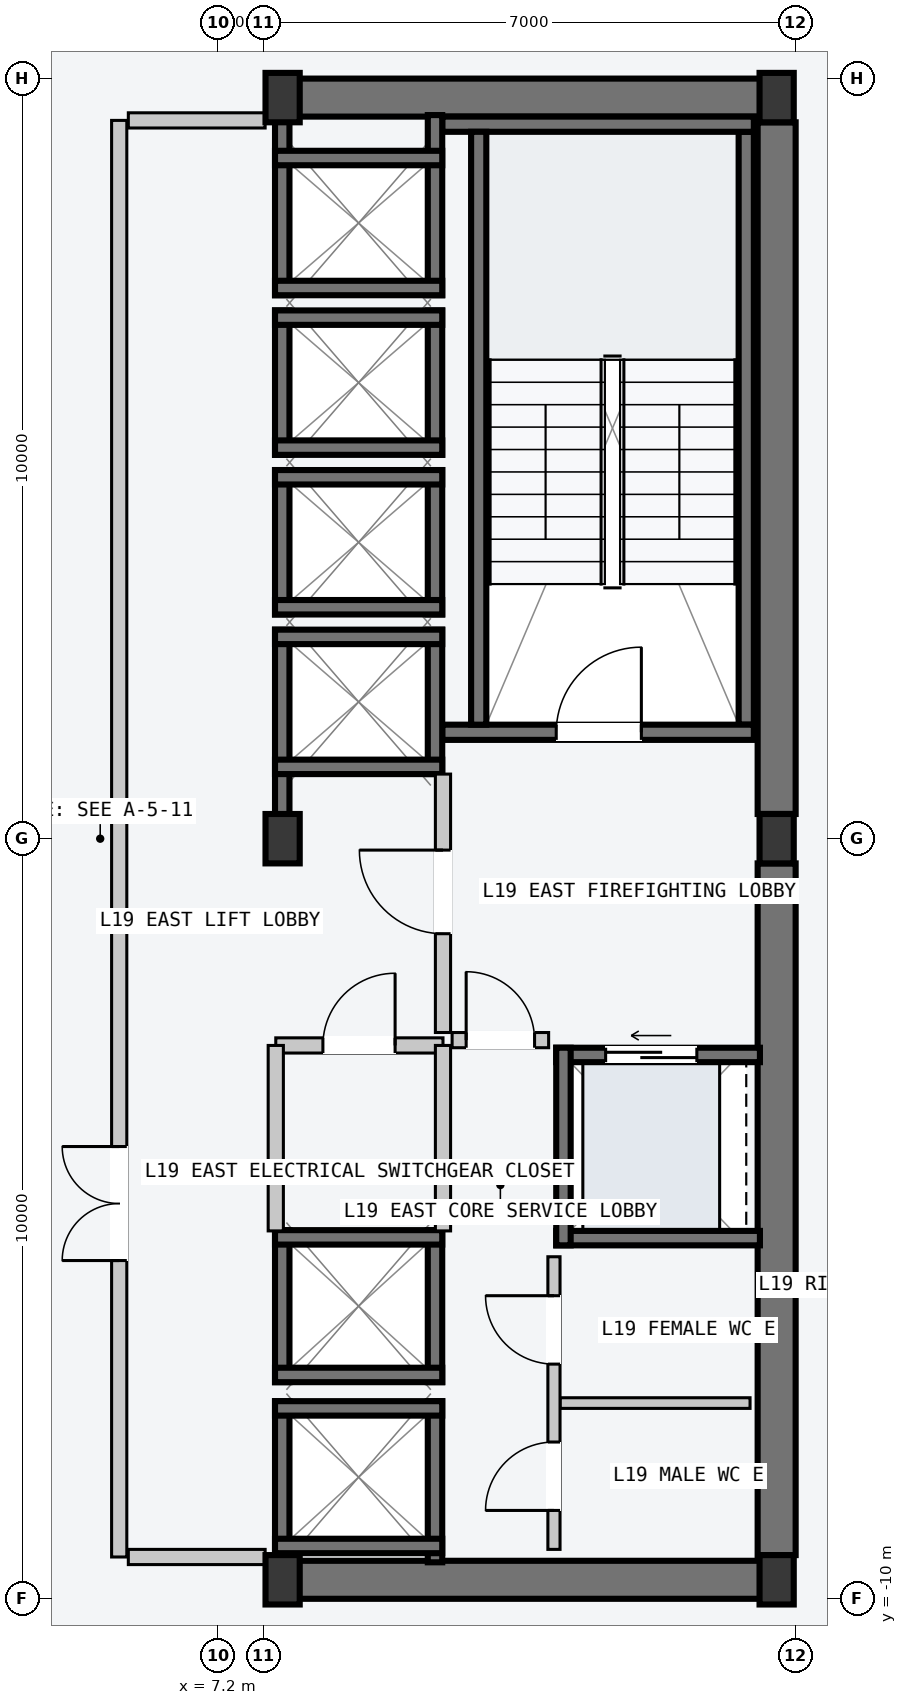
"""IFC4 building model, lengths in metres.
Left out: names, types, materials, properties, quantities, classifications, styles, units other than length and angle.
Written with IfcOpenShell. Run it as: python <this file> out.ifc"""

import sys

from ifc_helpers import new_model, si_unit, direction, frame, frame_2d, origin, origin_2d, place, context, subcontext, project, spatial, rectangle, i_section, extrude, element, fill, save


model = new_model("IFC4")
c1 = context("Model", 3, precision=1e-05, world=origin(), true_north=direction((0.0, 1.0)))
c2 = subcontext(c1, "Body", "Model", "MODEL_VIEW")
j1 = project(units=[si_unit("LENGTHUNIT", "METRE"), si_unit("PLANEANGLEUNIT", "RADIAN")], contexts=[c1])
p1 = place(None, origin())
s1 = spatial("IfcSite", under=j1, at=p1, CompositionType="ELEMENT")
p2 = place(p1, origin())
s2 = spatial("IfcBuilding", under=s1, at=p2, CompositionType="ELEMENT")
p3 = place(p2, frame((0.0, 0.0, 74.4)))
s3 = spatial("IfcBuildingStorey", under=s2, at=p3, CompositionType="ELEMENT", Elevation=74.4)
for number, where, z_axis, x_axis in (
    (1, (8.07, -9.75, -0.2), (0.0, 0.0, 1.0), (1.0, 0.0, 0.0)),
    (2, (8.07, 9.75, -0.2), (0.0, 0.0, 1.0), (1.0, 0.0, 0.0)),
):
    element("IfcWall", number, at=place(p3, frame(where, z_axis=z_axis, x_axis=x_axis)), inside=s3, PredefinedType="SHEAR", context=c2, shape_type="SweptSolid", body=[
        extrude(rectangle(XDim=6.46, YDim=0.5, at=frame_2d((3.23, 0.0))), origin(), (0.0, 0.0, 1.0), 3.6),
    ])
for number, where, z_axis, x_axis in (
    (3, (14.55, -9.425, -0.2), (0.0, 0.0, 1.0), (0.0, 1.0, 0.0)),
    (4, (14.55, 0.325, -0.2), (0.0, 0.0, 1.0), (0.0, 1.0, 0.0)),
):
    element("IfcWall", number, at=place(p3, frame(where, z_axis=z_axis, x_axis=x_axis)), inside=s3, PredefinedType="SHEAR", context=c2, shape_type="SweptSolid", body=[
        extrude(rectangle(XDim=9.1, YDim=0.5, at=frame_2d((4.55, 0.0))), origin(), (0.0, 0.0, 1.0), 3.6),
    ])
p4 = place(p3, frame((14.15, 1.5, -0.2), z_axis=(0.0, 0.0, 1.0), x_axis=(0.0, 1.0, 0.0)))
e5 = element("IfcWall", 5, at=p4, inside=s3, PredefinedType="SOLIDWALL", context=c2, shape_type="SweptSolid", body=[
    extrude(rectangle(XDim=7.8, YDim=0.2, at=frame_2d((3.9, 0.0))), origin(), (0.0, 0.0, 1.0), 3.6),
])
p5 = place(p3, frame((10.15, 1.4, -0.2), z_axis=(0.0, 0.0, 1.0), x_axis=(1.0, 0.0, 0.0)))
e6 = element("IfcWall", 6, at=p5, inside=s3, PredefinedType="SOLIDWALL", context=c2, shape_type="SweptSolid", body=[
    extrude(rectangle(XDim=4.1, YDim=0.2, at=frame_2d((2.05, 0.0))), origin(), (0.0, 0.0, 1.0), 3.6),
])
p6 = place(p5, frame((1.5, 0.0, 0.2)))
e7 = element("IfcOpeningElement", 7, at=p6, cuts=e6, PredefinedType="OPENING", context=c2, shape_type="SweptSolid", body=[
    extrude(rectangle(XDim=1.12, YDim=2.18, at=frame_2d((0.56, 1.09))), frame((0.0, 0.11, 0.0), z_axis=(0.0, -1.0, 0.0), x_axis=(1.0, 0.0, 0.0)), (0.0, 0.0, 1.0), 0.22),
])
p7 = place(p3, frame((10.15, 9.4, -0.2), z_axis=(0.0, 0.0, 1.0), x_axis=(1.0, 0.0, 0.0)))
e8 = element("IfcWall", 8, at=p7, inside=s3, PredefinedType="SOLIDWALL", context=c2, shape_type="SweptSolid", body=[
    extrude(rectangle(XDim=4.1, YDim=0.2, at=frame_2d((2.05, 0.0))), origin(), (0.0, 0.0, 1.0), 3.6),
])
p8 = place(p3, frame((10.63, 1.5, -0.2), z_axis=(0.0, 0.0, 1.0), x_axis=(0.0, 1.0, 0.0)))
e9 = element("IfcWall", 9, at=p8, inside=s3, PredefinedType="SOLIDWALL", context=c2, shape_type="SweptSolid", body=[
    extrude(rectangle(XDim=7.8, YDim=0.2, at=frame_2d((3.9, 0.0))), origin(), (0.0, 0.0, 1.0), 3.6),
])
for number, where, z_axis, x_axis in (
    (10, (8.05, -9.75, 0.0), (0.0, 0.0, 1.0), (1.0, 0.0, 0.0)),
    (11, (8.05, 0.0, 0.0), (0.0, 0.0, 1.0), (1.0, 0.0, 0.0)),
    (12, (8.05, 9.75, 0.0), (0.0, 0.0, 1.0), (1.0, 0.0, 0.0)),
    (13, (14.55, -9.75, 0.0), (0.0, 0.0, 1.0), (1.0, 0.0, 0.0)),
    (14, (14.55, 0.0, 0.0), (0.0, 0.0, 1.0), (1.0, 0.0, 0.0)),
    (15, (14.55, 9.75, 0.0), (0.0, 0.0, 1.0), (1.0, 0.0, 0.0)),
):
    element("IfcColumn", number, at=place(p3, frame(where, z_axis=z_axis, x_axis=x_axis)), inside=s3, PredefinedType="COLUMN", context=c2, shape_type="SweptSolid", body=[
        extrude(i_section(OverallWidth=0.45, OverallDepth=0.65, WebThickness=0.025, FlangeThickness=0.04, at=origin_2d()), origin(), (0.0, 0.0, 1.0), 3.6),
    ])
p9 = place(p3, frame((8.045, 0.21, -0.2), z_axis=(0.0, 0.0, 1.0), x_axis=(0.0, 1.0, 0.0)))
e16 = element("IfcWall", 16, at=p9, inside=s3, PredefinedType="SOLIDWALL", context=c2, shape_type="SweptSolid", body=[
    extrude(rectangle(XDim=2.54, YDim=0.19, at=frame_2d((1.27, 0.0))), origin(), (0.0, 0.0, 1.0), 3.6),
])
p10 = place(p3, frame((10.055, 0.85, -0.2), z_axis=(0.0, 0.0, 1.0), x_axis=(0.0, 1.0, 0.0)))
e17 = element("IfcWall", 17, at=p10, inside=s3, PredefinedType="SOLIDWALL", context=c2, shape_type="SweptSolid", body=[
    extrude(rectangle(XDim=1.9, YDim=0.19, at=frame_2d((0.95, 0.0))), origin(), (0.0, 0.0, 1.0), 3.6),
])
for number, where, z_axis, x_axis in (
    (18, (7.95, 2.655, -0.2), (0.0, 0.0, 1.0), (1.0, 0.0, 0.0)),
    (19, (7.95, 0.945, -0.2), (0.0, 0.0, 1.0), (1.0, 0.0, 0.0)),
):
    element("IfcWall", number, at=place(p3, frame(where, z_axis=z_axis, x_axis=x_axis)), inside=s3, PredefinedType="SOLIDWALL", context=c2, shape_type="SweptSolid", body=[
        extrude(rectangle(XDim=2.2, YDim=0.19, at=frame_2d((1.1, 0.0))), origin(), (0.0, 0.0, 1.0), 3.6),
    ])
for number, where, z_axis, x_axis in (
    (20, (8.045, 2.95, -0.2), (0.0, 0.0, 1.0), (0.0, 1.0, 0.0)),
    (21, (10.055, 2.95, -0.2), (0.0, 0.0, 1.0), (0.0, 1.0, 0.0)),
):
    element("IfcWall", number, at=place(p3, frame(where, z_axis=z_axis, x_axis=x_axis)), inside=s3, PredefinedType="SOLIDWALL", context=c2, shape_type="SweptSolid", body=[
        extrude(rectangle(XDim=1.9, YDim=0.19, at=frame_2d((0.95, 0.0))), origin(), (0.0, 0.0, 1.0), 3.6),
    ])
for number, where, z_axis, x_axis in (
    (22, (7.95, 4.755, -0.2), (0.0, 0.0, 1.0), (1.0, 0.0, 0.0)),
    (23, (7.95, 3.045, -0.2), (0.0, 0.0, 1.0), (1.0, 0.0, 0.0)),
):
    element("IfcWall", number, at=place(p3, frame(where, z_axis=z_axis, x_axis=x_axis)), inside=s3, PredefinedType="SOLIDWALL", context=c2, shape_type="SweptSolid", body=[
        extrude(rectangle(XDim=2.2, YDim=0.19, at=frame_2d((1.1, 0.0))), origin(), (0.0, 0.0, 1.0), 3.6),
    ])
for number, where, z_axis, x_axis in (
    (24, (8.045, 5.05, -0.2), (0.0, 0.0, 1.0), (0.0, 1.0, 0.0)),
    (25, (10.055, 5.05, -0.2), (0.0, 0.0, 1.0), (0.0, 1.0, 0.0)),
):
    element("IfcWall", number, at=place(p3, frame(where, z_axis=z_axis, x_axis=x_axis)), inside=s3, PredefinedType="SOLIDWALL", context=c2, shape_type="SweptSolid", body=[
        extrude(rectangle(XDim=1.9, YDim=0.19, at=frame_2d((0.95, 0.0))), origin(), (0.0, 0.0, 1.0), 3.6),
    ])
for number, where, z_axis, x_axis in (
    (26, (7.95, 6.855, -0.2), (0.0, 0.0, 1.0), (1.0, 0.0, 0.0)),
    (27, (7.95, 5.145, -0.2), (0.0, 0.0, 1.0), (1.0, 0.0, 0.0)),
):
    element("IfcWall", number, at=place(p3, frame(where, z_axis=z_axis, x_axis=x_axis)), inside=s3, PredefinedType="SOLIDWALL", context=c2, shape_type="SweptSolid", body=[
        extrude(rectangle(XDim=2.2, YDim=0.19, at=frame_2d((1.1, 0.0))), origin(), (0.0, 0.0, 1.0), 3.6),
    ])
for number, where, z_axis, x_axis in (
    (28, (8.045, 7.15, -0.2), (0.0, 0.0, 1.0), (0.0, 1.0, 0.0)),
    (29, (10.055, 7.15, -0.2), (0.0, 0.0, 1.0), (0.0, 1.0, 0.0)),
):
    element("IfcWall", number, at=place(p3, frame(where, z_axis=z_axis, x_axis=x_axis)), inside=s3, PredefinedType="SOLIDWALL", context=c2, shape_type="SweptSolid", body=[
        extrude(rectangle(XDim=2.37, YDim=0.19, at=frame_2d((1.185, 0.0))), origin(), (0.0, 0.0, 1.0), 3.6),
    ])
for number, where, z_axis, x_axis in (
    (30, (7.95, 8.955, -0.2), (0.0, 0.0, 1.0), (1.0, 0.0, 0.0)),
    (31, (7.95, 7.245, -0.2), (0.0, 0.0, 1.0), (1.0, 0.0, 0.0)),
):
    element("IfcWall", number, at=place(p3, frame(where, z_axis=z_axis, x_axis=x_axis)), inside=s3, PredefinedType="SOLIDWALL", context=c2, shape_type="SweptSolid", body=[
        extrude(rectangle(XDim=2.2, YDim=0.19, at=frame_2d((1.1, 0.0))), origin(), (0.0, 0.0, 1.0), 3.6),
    ])
for number, where, z_axis, x_axis in (
    (32, (8.045, -9.52, -0.2), (0.0, 0.0, 1.0), (0.0, 1.0, 0.0)),
    (33, (10.055, -9.52, -0.2), (0.0, 0.0, 1.0), (0.0, 1.0, 0.0)),
):
    element("IfcWall", number, at=place(p3, frame(where, z_axis=z_axis, x_axis=x_axis)), inside=s3, PredefinedType="SOLIDWALL", context=c2, shape_type="SweptSolid", body=[
        extrude(rectangle(XDim=2.12, YDim=0.19, at=frame_2d((1.06, 0.0))), origin(), (0.0, 0.0, 1.0), 3.6),
    ])
for number, where, z_axis, x_axis in (
    (34, (7.95, -7.495, -0.2), (0.0, 0.0, 1.0), (1.0, 0.0, 0.0)),
    (35, (7.95, -9.305, -0.2), (0.0, 0.0, 1.0), (1.0, 0.0, 0.0)),
):
    element("IfcWall", number, at=place(p3, frame(where, z_axis=z_axis, x_axis=x_axis)), inside=s3, PredefinedType="SOLIDWALL", context=c2, shape_type="SweptSolid", body=[
        extrude(rectangle(XDim=2.2, YDim=0.19, at=frame_2d((1.1, 0.0))), origin(), (0.0, 0.0, 1.0), 3.6),
    ])
for number, where, z_axis, x_axis in (
    (36, (8.045, -7.15, -0.2), (0.0, 0.0, 1.0), (0.0, 1.0, 0.0)),
    (37, (10.055, -7.15, -0.2), (0.0, 0.0, 1.0), (0.0, 1.0, 0.0)),
):
    element("IfcWall", number, at=place(p3, frame(where, z_axis=z_axis, x_axis=x_axis)), inside=s3, PredefinedType="SOLIDWALL", context=c2, shape_type="SweptSolid", body=[
        extrude(rectangle(XDim=2.0, YDim=0.19, at=frame_2d((1.0, 0.0))), origin(), (0.0, 0.0, 1.0), 3.6),
    ])
for number, where, z_axis, x_axis in (
    (38, (7.95, -5.245, -0.2), (0.0, 0.0, 1.0), (1.0, 0.0, 0.0)),
    (39, (7.95, -7.055, -0.2), (0.0, 0.0, 1.0), (1.0, 0.0, 0.0)),
):
    element("IfcWall", number, at=place(p3, frame(where, z_axis=z_axis, x_axis=x_axis)), inside=s3, PredefinedType="SOLIDWALL", context=c2, shape_type="SweptSolid", body=[
        extrude(rectangle(XDim=2.2, YDim=0.19, at=frame_2d((1.1, 0.0))), origin(), (0.0, 0.0, 1.0), 3.6),
    ])
p11 = place(p3, frame((11.65, -2.845, -0.2), z_axis=(0.0, 0.0, 1.0), x_axis=(1.0, 0.0, 0.0)))
e40 = element("IfcWall", 40, at=p11, inside=s3, PredefinedType="SOLIDWALL", context=c2, shape_type="SweptSolid", body=[
    extrude(rectangle(XDim=2.68, YDim=0.19, at=frame_2d((1.34, 0.0))), origin(), (0.0, 0.0, 1.0), 3.6),
])
p12 = place(p11, frame((0.65, 0.0, 0.2)))
e41 = element("IfcOpeningElement", 41, at=p12, cuts=e40, PredefinedType="OPENING", context=c2, shape_type="SweptSolid", body=[
    extrude(rectangle(XDim=1.2, YDim=2.2, at=frame_2d((0.6, 1.1))), frame((0.0, 0.105, 0.0), z_axis=(0.0, -1.0, 0.0), x_axis=(1.0, 0.0, 0.0)), (0.0, 0.0, 1.0), 0.21),
])
p13 = place(p3, frame((11.65, -5.255, -0.2), z_axis=(0.0, 0.0, 1.0), x_axis=(1.0, 0.0, 0.0)))
e42 = element("IfcWall", 42, at=p13, inside=s3, PredefinedType="SOLIDWALL", context=c2, shape_type="SweptSolid", body=[
    extrude(rectangle(XDim=2.68, YDim=0.19, at=frame_2d((1.34, 0.0))), origin(), (0.0, 0.0, 1.0), 3.6),
])
p14 = place(p3, frame((11.745, -5.35, -0.2), z_axis=(0.0, 0.0, 1.0), x_axis=(0.0, 1.0, 0.0)))
e43 = element("IfcWall", 43, at=p14, inside=s3, PredefinedType="SOLIDWALL", context=c2, shape_type="SweptSolid", body=[
    extrude(rectangle(XDim=2.6, YDim=0.19, at=frame_2d((1.3, 0.0))), origin(), (0.0, 0.0, 1.0), 3.6),
])
p15 = place(p3, frame((5.9, -9.45, 0.0), z_axis=(0.0, 0.0, 1.0), x_axis=(0.0, 1.0, 0.0)))
e44 = element("IfcWall", 44, at=p15, inside=s3, PredefinedType="PARTITIONING", context=c2, shape_type="SweptSolid", body=[
    extrude(rectangle(XDim=18.9, YDim=0.2, at=frame_2d((9.45, 0.0))), origin(), (0.0, 0.0, 1.0), 3.4),
])
p16 = place(p15, frame((3.9, 0.0, 0.0)))
e45 = element("IfcOpeningElement", 45, at=p16, cuts=e44, PredefinedType="OPENING", context=c2, shape_type="SweptSolid", body=[
    extrude(rectangle(XDim=1.5, YDim=2.2, at=frame_2d((0.75, 1.1))), frame((0.0, 0.11, 0.0), z_axis=(0.0, -1.0, 0.0), x_axis=(1.0, 0.0, 0.0)), (0.0, 0.0, 1.0), 0.22),
])
for number, where, z_axis, x_axis in (
    (46, (6.02, -9.45, 0.0), (0.0, 0.0, 1.0), (1.0, 0.0, 0.0)),
    (47, (6.02, 9.45, 0.0), (0.0, 0.0, 1.0), (1.0, 0.0, 0.0)),
):
    element("IfcWall", number, at=place(p3, frame(where, z_axis=z_axis, x_axis=x_axis)), inside=s3, PredefinedType="PARTITIONING", context=c2, shape_type="SweptSolid", body=[
        extrude(rectangle(XDim=1.8, YDim=0.2, at=frame_2d((0.9, 0.0))), origin(), (0.0, 0.0, 1.0), 3.4),
    ])
p17 = place(p3, frame((10.16, -2.55, 0.0), z_axis=(0.0, 0.0, 1.0), x_axis=(0.0, 1.0, 0.0)))
e48 = element("IfcWall", 48, at=p17, inside=s3, PredefinedType="PARTITIONING", context=c2, shape_type="SweptSolid", body=[
    extrude(rectangle(XDim=3.4, YDim=0.2, at=frame_2d((1.7, 0.0))), origin(), (0.0, 0.0, 1.0), 3.4),
])
p18 = place(p17, frame((1.3, 0.0, 0.0)))
e49 = element("IfcOpeningElement", 49, at=p18, cuts=e48, PredefinedType="OPENING", context=c2, shape_type="SweptSolid", body=[
    extrude(rectangle(XDim=1.1, YDim=2.15, at=frame_2d((0.55, 1.075))), frame((0.0, 0.11, 0.0), z_axis=(0.0, -1.0, 0.0), x_axis=(1.0, 0.0, 0.0)), (0.0, 0.0, 1.0), 0.22),
])
p19 = place(p3, frame((10.28, -2.65, 0.0), z_axis=(0.0, 0.0, 1.0), x_axis=(1.0, 0.0, 0.0)))
e50 = element("IfcWall", 50, at=p19, inside=s3, PredefinedType="PARTITIONING", context=c2, shape_type="SweptSolid", body=[
    extrude(rectangle(XDim=1.27, YDim=0.2, at=frame_2d((0.635, 0.0))), origin(), (0.0, 0.0, 1.0), 3.4),
])
p20 = place(p19, frame((0.185, 0.0, 0.0)))
e51 = element("IfcOpeningElement", 51, at=p20, cuts=e50, PredefinedType="OPENING", context=c2, shape_type="SweptSolid", body=[
    extrude(rectangle(XDim=0.9, YDim=2.15, at=frame_2d((0.45, 1.075))), frame((0.0, 0.11, 0.0), z_axis=(0.0, -1.0, 0.0), x_axis=(1.0, 0.0, 0.0)), (0.0, 0.0, 1.0), 0.22),
])
p21 = place(p3, frame((7.96, -2.72, 0.0), z_axis=(0.0, 0.0, 1.0), x_axis=(1.0, 0.0, 0.0)))
e52 = element("IfcWall", 52, at=p21, inside=s3, PredefinedType="PARTITIONING", context=c2, shape_type="SweptSolid", body=[
    extrude(rectangle(XDim=2.2, YDim=0.2, at=frame_2d((1.1, 0.0))), origin(), (0.0, 0.0, 1.0), 3.4),
])
p22 = place(p21, frame((0.62, 0.0, 0.0)))
e53 = element("IfcOpeningElement", 53, at=p22, cuts=e52, PredefinedType="OPENING", context=c2, shape_type="SweptSolid", body=[
    extrude(rectangle(XDim=0.95, YDim=2.1, at=frame_2d((0.475, 1.05))), frame((0.0, 0.11, 0.0), z_axis=(0.0, -1.0, 0.0), x_axis=(1.0, 0.0, 0.0)), (0.0, 0.0, 1.0), 0.22),
])
for number, where, z_axis, x_axis in (
    (54, (7.96, -5.16, 0.0), (0.0, 0.0, 1.0), (0.0, 1.0, 0.0)),
    (55, (10.16, -5.16, 0.0), (0.0, 0.0, 1.0), (0.0, 1.0, 0.0)),
):
    element("IfcWall", number, at=place(p3, frame(where, z_axis=z_axis, x_axis=x_axis)), inside=s3, PredefinedType="PARTITIONING", context=c2, shape_type="SweptSolid", body=[
        extrude(rectangle(XDim=2.44, YDim=0.2, at=frame_2d((1.22, 0.0))), origin(), (0.0, 0.0, 1.0), 3.4),
    ])
p23 = place(p3, frame((11.7, -7.425, 0.0), z_axis=(0.0, 0.0, 1.0), x_axis=(1.0, 0.0, 0.0)))
e56 = element("IfcWall", 56, at=p23, inside=s3, PredefinedType="PARTITIONING", context=c2, shape_type="SweptSolid", body=[
    extrude(rectangle(XDim=2.5, YDim=0.14, at=frame_2d((1.25, 0.0))), origin(), (0.0, 0.0, 1.0), 3.4),
])
p24 = place(p3, frame((11.62, -9.35, 0.0), z_axis=(0.0, 0.0, 1.0), x_axis=(0.0, 1.0, 0.0)))
e57 = element("IfcWall", 57, at=p24, inside=s3, PredefinedType="PARTITIONING", context=c2, shape_type="SweptSolid", body=[
    extrude(rectangle(XDim=3.85, YDim=0.16, at=frame_2d((1.925, 0.0))), origin(), (0.0, 0.0, 1.0), 3.4),
])
p25 = place(p24, frame((0.512, 0.0, 0.0)))
e58 = element("IfcOpeningElement", 58, at=p25, cuts=e57, PredefinedType="OPENING", context=c2, shape_type="SweptSolid", body=[
    extrude(rectangle(XDim=0.9, YDim=2.15, at=frame_2d((0.45, 1.075))), frame((0.0, 0.09, 0.0), z_axis=(0.0, -1.0, 0.0), x_axis=(1.0, 0.0, 0.0)), (0.0, 0.0, 1.0), 0.18),
])
p26 = place(p24, frame((2.438, 0.0, 0.0)))
e59 = element("IfcOpeningElement", 59, at=p26, cuts=e57, PredefinedType="OPENING", context=c2, shape_type="SweptSolid", body=[
    extrude(rectangle(XDim=0.9, YDim=2.15, at=frame_2d((0.45, 1.075))), frame((0.0, 0.09, 0.0), z_axis=(0.0, -1.0, 0.0), x_axis=(1.0, 0.0, 0.0)), (0.0, 0.0, 1.0), 0.18),
])
p27 = place(p6, origin())
e60 = element("IfcDoor", 60, at=p27, inside=s3, OperationType="SINGLE_SWING_RIGHT", PredefinedType="DOOR", context=c2, shape_type="SweptSolid", body=[
    extrude(rectangle(XDim=1.12, YDim=2.18, at=frame_2d((0.56, 1.09))), frame((0.0, 0.025, 0.0), z_axis=(0.0, -1.0, 0.0), x_axis=(1.0, 0.0, 0.0)), (0.0, 0.0, 1.0), 0.05),
])
fill(e7, e60)
p28 = place(p12, origin())
e61 = element("IfcDoor", 61, at=p28, inside=s3, OperationType="SLIDING_TO_LEFT", PredefinedType="DOOR", context=c2, shape_type="SweptSolid", body=[
    extrude(rectangle(XDim=1.2, YDim=2.2, at=frame_2d((0.6, 1.1))), frame((0.0, 0.025, 0.0), z_axis=(0.0, -1.0, 0.0), x_axis=(1.0, 0.0, 0.0)), (0.0, 0.0, 1.0), 0.05),
])
fill(e41, e61)
p29 = place(p16, origin())
e62 = element("IfcDoor", 62, at=p29, inside=s3, OperationType="DOUBLE_DOOR_SINGLE_SWING", PredefinedType="DOOR", context=c2, shape_type="SweptSolid", body=[
    extrude(rectangle(XDim=1.5, YDim=2.2, at=frame_2d((0.75, 1.1))), frame((0.0, 0.025, 0.0), z_axis=(0.0, -1.0, 0.0), x_axis=(1.0, 0.0, 0.0)), (0.0, 0.0, 1.0), 0.05),
])
fill(e45, e62)
p30 = place(p18, origin())
e63 = element("IfcDoor", 63, at=p30, inside=s3, OperationType="SINGLE_SWING_RIGHT", PredefinedType="DOOR", context=c2, shape_type="SweptSolid", body=[
    extrude(rectangle(XDim=1.1, YDim=2.15, at=frame_2d((0.55, 1.075))), frame((0.0, 0.025, 0.0), z_axis=(0.0, -1.0, 0.0), x_axis=(1.0, 0.0, 0.0)), (0.0, 0.0, 1.0), 0.05),
])
fill(e49, e63)
p31 = place(p20, origin())
e64 = element("IfcDoor", 64, at=p31, inside=s3, OperationType="SINGLE_SWING_LEFT", PredefinedType="DOOR", context=c2, shape_type="SweptSolid", body=[
    extrude(rectangle(XDim=0.9, YDim=2.15, at=frame_2d((0.45, 1.075))), frame((0.0, 0.025, 0.0), z_axis=(0.0, -1.0, 0.0), x_axis=(1.0, 0.0, 0.0)), (0.0, 0.0, 1.0), 0.05),
])
fill(e51, e64)
p32 = place(p22, origin())
e65 = element("IfcDoor", 65, at=p32, inside=s3, OperationType="SINGLE_SWING_RIGHT", PredefinedType="DOOR", context=c2, shape_type="SweptSolid", body=[
    extrude(rectangle(XDim=0.95, YDim=2.1, at=frame_2d((0.475, 1.05))), frame((0.0, 0.025, 0.0), z_axis=(0.0, -1.0, 0.0), x_axis=(1.0, 0.0, 0.0)), (0.0, 0.0, 1.0), 0.05),
])
fill(e53, e65)
p33 = place(p25, origin())
e66 = element("IfcDoor", 66, at=p33, inside=s3, OperationType="SINGLE_SWING_LEFT", PredefinedType="DOOR", context=c2, shape_type="SweptSolid", body=[
    extrude(rectangle(XDim=0.9, YDim=2.15, at=frame_2d((0.45, 1.075))), frame((0.0, 0.025, 0.0), z_axis=(0.0, -1.0, 0.0), x_axis=(1.0, 0.0, 0.0)), (0.0, 0.0, 1.0), 0.05),
])
fill(e58, e66)
p34 = place(p26, origin())
e67 = element("IfcDoor", 67, at=p34, inside=s3, OperationType="SINGLE_SWING_RIGHT", PredefinedType="DOOR", context=c2, shape_type="SweptSolid", body=[
    extrude(rectangle(XDim=0.9, YDim=2.15, at=frame_2d((0.45, 1.075))), frame((0.0, 0.025, 0.0), z_axis=(0.0, -1.0, 0.0), x_axis=(1.0, 0.0, 0.0)), (0.0, 0.0, 1.0), 0.05),
])
fill(e59, e67)
save(model, sys.argv[1])
